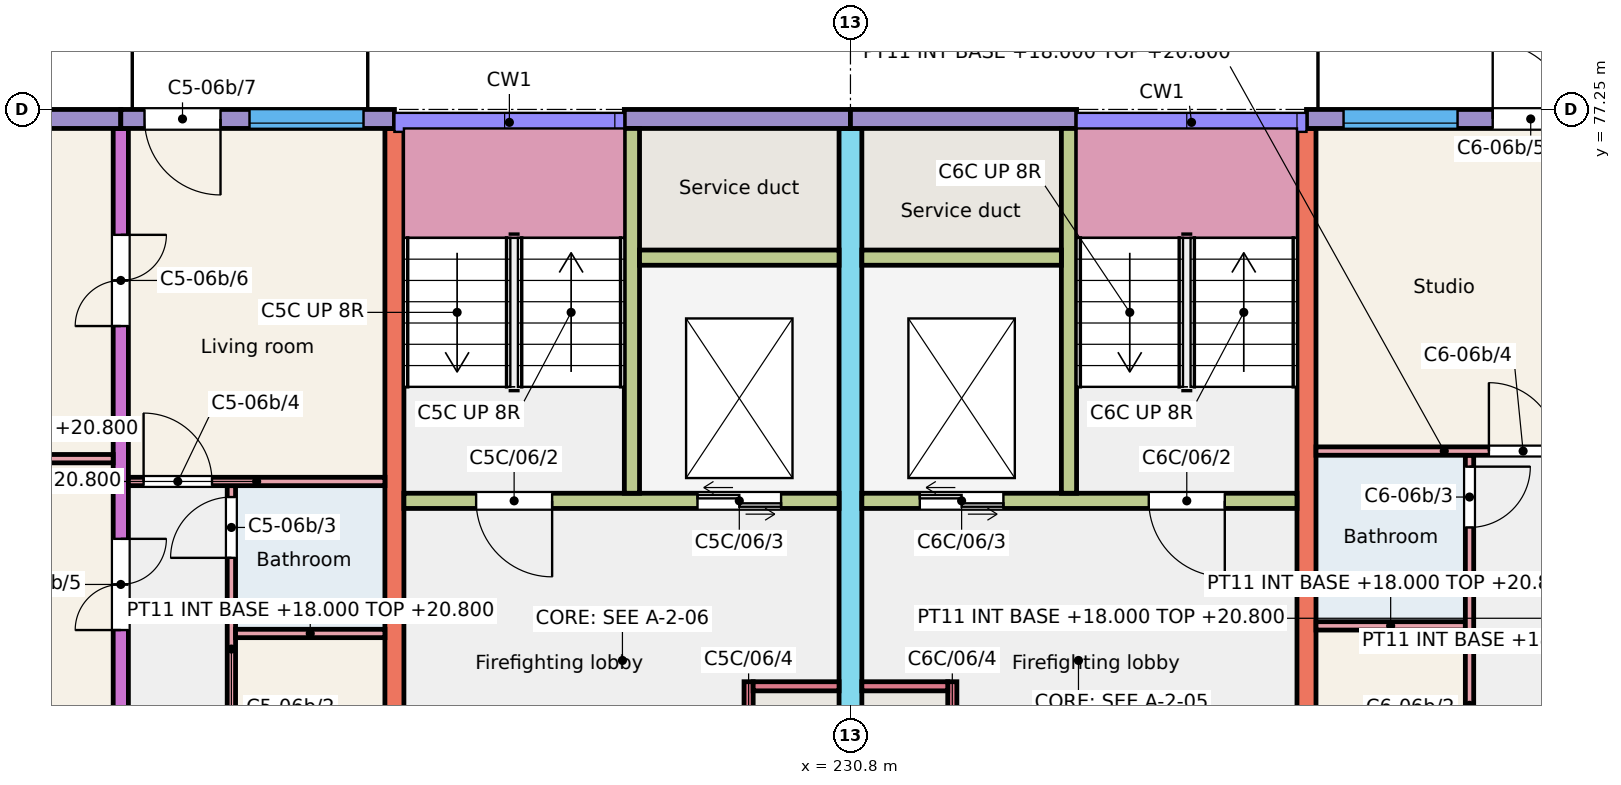
"""IFC4 building model, lengths in metres.
Left out: names, types, materials, properties, quantities, classifications, styles, units other than length and angle.
Written with IfcOpenShell. Run it as: python <this file> out.ifc"""

import sys

from ifc_helpers import new_model, si_unit, direction, frame, frame_2d, origin, place, context, subcontext, project, spatial, rectangle, extrude, element, fill, save


model = new_model("IFC4")
c1 = context("Model", 3, precision=1e-05, world=origin(), true_north=direction((0.0, 1.0)))
c2 = subcontext(c1, "Body", "Model", "MODEL_VIEW")
j1 = project(units=[si_unit("LENGTHUNIT", "METRE"), si_unit("PLANEANGLEUNIT", "RADIAN")], contexts=[c1])
p1 = place(None, origin())
s1 = spatial("IfcSite", under=j1, at=p1, CompositionType="ELEMENT")
p2 = place(p1, origin())
s2 = spatial("IfcBuilding", under=s1, at=p2, CompositionType="ELEMENT")
p3 = place(p2, frame((0.0, 0.0, 18.0)))
s3 = spatial("IfcBuildingStorey", under=s2, at=p3, CompositionType="ELEMENT", Elevation=18.0)
p4 = place(p3, frame((221.2, 68.0, 0.0), z_axis=(0.0, 0.0, 1.0), x_axis=(0.0, 1.0, 0.0)))
e1 = element("IfcWall", 1, at=p4, inside=s3, PredefinedType="SHEAR", context=c2, shape_type="SweptSolid", body=[
    extrude(rectangle(XDim=9.0, YDim=0.2, at=frame_2d((4.5, 0.0))), origin(), (0.0, 0.0, 1.0), 3.0),
])
p5 = place(p4, frame((2.4, 0.0, 0.0)))
e2 = element("IfcOpeningElement", 2, at=p5, cuts=e1, PredefinedType="OPENING", context=c2, shape_type="SweptSolid", body=[
    extrude(rectangle(XDim=1.2, YDim=2.1, at=frame_2d((0.6, 1.05))), frame((0.0, 0.11, 0.0), z_axis=(0.0, -1.0, 0.0), x_axis=(1.0, 0.0, 0.0)), (0.0, 0.0, 1.0), 0.22),
])
p6 = place(p4, frame((6.4, 0.0, 0.0)))
e3 = element("IfcOpeningElement", 3, at=p6, cuts=e1, PredefinedType="OPENING", context=c2, shape_type="SweptSolid", body=[
    extrude(rectangle(XDim=1.2, YDim=2.1, at=frame_2d((0.6, 1.05))), frame((0.0, 0.11, 0.0), z_axis=(0.0, -1.0, 0.0), x_axis=(1.0, 0.0, 0.0)), (0.0, 0.0, 1.0), 0.22),
])
p7 = place(p3, frame((224.8, 68.0, 0.0), z_axis=(0.0, 0.0, 1.0), x_axis=(0.0, 1.0, 0.0)))
e4 = element("IfcWall", 4, at=p7, inside=s3, PredefinedType="SHEAR", context=c2, shape_type="SweptSolid", body=[
    extrude(rectangle(XDim=9.0, YDim=0.25, at=frame_2d((4.5, 0.0))), origin(), (0.0, 0.0, 1.0), 3.0),
])
p8 = place(p3, frame((230.8, 66.0, 0.0), z_axis=(0.0, 0.0, 1.0), x_axis=(0.0, 1.0, 0.0)))
e5 = element("IfcWall", 5, at=p8, inside=s3, PredefinedType="SHEAR", context=c2, shape_type="SweptSolid", body=[
    extrude(rectangle(XDim=11.0, YDim=0.3, at=frame_2d((5.5, 0.0))), origin(), (0.0, 0.0, 1.0), 3.0),
])
p9 = place(p8, frame((0.3, 0.0, 0.0)))
e6 = element("IfcOpeningElement", 6, at=p9, cuts=e5, PredefinedType="OPENING", context=c2, shape_type="SweptSolid", body=[
    extrude(rectangle(XDim=1.2, YDim=2.1, at=frame_2d((0.6, 1.05))), frame((0.0, 0.16, 0.0), z_axis=(0.0, -1.0, 0.0), x_axis=(1.0, 0.0, 0.0)), (0.0, 0.0, 1.0), 0.32),
])
p10 = place(p3, frame((236.8, 68.0, 0.0), z_axis=(0.0, 0.0, 1.0), x_axis=(0.0, 1.0, 0.0)))
e7 = element("IfcWall", 7, at=p10, inside=s3, PredefinedType="SHEAR", context=c2, shape_type="SweptSolid", body=[
    extrude(rectangle(XDim=9.0, YDim=0.25, at=frame_2d((4.5, 0.0))), origin(), (0.0, 0.0, 1.0), 3.0),
])
p11 = place(p3, frame((217.6, 77.125, 0.0), z_axis=(0.0, 0.0, 1.0), x_axis=(1.0, 0.0, 0.0)))
e8 = element("IfcWall", 8, at=p11, inside=s3, PredefinedType="SOLIDWALL", context=c2, shape_type="SweptSolid", body=[
    extrude(rectangle(XDim=3.6, YDim=0.25, at=frame_2d((1.8, 0.0))), origin(), (0.0, 0.0, 1.0), 3.0),
])
p12 = place(p11, frame((1.05, 0.0, 0.9)))
e9 = element("IfcOpeningElement", 9, at=p12, cuts=e8, PredefinedType="OPENING", context=c2, shape_type="SweptSolid", body=[
    extrude(rectangle(XDim=1.5, YDim=1.5, at=frame_2d((0.75, 0.75))), frame((0.0, 0.135, 0.0), z_axis=(0.0, -1.0, 0.0), x_axis=(1.0, 0.0, 0.0)), (0.0, 0.0, 1.0), 0.27),
])
p13 = place(p3, frame((221.2, 77.125, 0.0), z_axis=(0.0, 0.0, 1.0), x_axis=(1.0, 0.0, 0.0)))
e10 = element("IfcWall", 10, at=p13, inside=s3, PredefinedType="SOLIDWALL", context=c2, shape_type="SweptSolid", body=[
    extrude(rectangle(XDim=3.6, YDim=0.25, at=frame_2d((1.8, 0.0))), origin(), (0.0, 0.0, 1.0), 3.0),
])
p14 = place(p13, frame((1.694, 0.0, 0.9)))
e11 = element("IfcOpeningElement", 11, at=p14, cuts=e10, PredefinedType="OPENING", context=c2, shape_type="SweptSolid", body=[
    extrude(rectangle(XDim=1.5, YDim=1.5, at=frame_2d((0.75, 0.75))), frame((0.0, 0.135, 0.0), z_axis=(0.0, -1.0, 0.0), x_axis=(1.0, 0.0, 0.0)), (0.0, 0.0, 1.0), 0.27),
])
p15 = place(p13, frame((0.312, 0.0, 0.0)))
e12 = element("IfcOpeningElement", 12, at=p15, cuts=e10, PredefinedType="OPENING", context=c2, shape_type="SweptSolid", body=[
    extrude(rectangle(XDim=1.0, YDim=2.1, at=frame_2d((0.5, 1.05))), frame((0.0, 0.135, 0.0), z_axis=(0.0, -1.0, 0.0), x_axis=(1.0, 0.0, 0.0)), (0.0, 0.0, 1.0), 0.27),
])
p16 = place(p3, frame((227.825, 77.125, 0.0), z_axis=(0.0, 0.0, 1.0), x_axis=(1.0, 0.0, 0.0)))
e13 = element("IfcWall", 13, at=p16, inside=s3, PredefinedType="SOLIDWALL", context=c2, shape_type="SweptSolid", body=[
    extrude(rectangle(XDim=2.975, YDim=0.25, at=frame_2d((1.488, 0.0))), origin(), (0.0, 0.0, 1.0), 3.0),
])
p17 = place(p3, frame((224.925, 72.1, 0.0), z_axis=(0.0, 0.0, 1.0), x_axis=(1.0, 0.0, 0.0)))
e14 = element("IfcWall", 14, at=p17, inside=s3, PredefinedType="SHEAR", context=c2, shape_type="SweptSolid", body=[
    extrude(rectangle(XDim=5.725, YDim=0.2, at=frame_2d((2.862, 0.0))), origin(), (0.0, 0.0, 1.0), 3.0),
])
p18 = place(p17, frame((0.95, 0.0, 0.0)))
e15 = element("IfcOpeningElement", 15, at=p18, cuts=e14, PredefinedType="OPENING", context=c2, shape_type="SweptSolid", body=[
    extrude(rectangle(XDim=1.0, YDim=2.1, at=frame_2d((0.5, 1.05))), frame((0.0, 0.11, 0.0), z_axis=(0.0, -1.0, 0.0), x_axis=(1.0, 0.0, 0.0)), (0.0, 0.0, 1.0), 0.22),
])
p19 = place(p17, frame((3.863, 0.0, 0.0)))
e16 = element("IfcOpeningElement", 16, at=p19, cuts=e14, PredefinedType="OPENING", context=c2, shape_type="SweptSolid", body=[
    extrude(rectangle(XDim=1.1, YDim=2.1, at=frame_2d((0.55, 1.05))), frame((0.0, 0.11, 0.0), z_axis=(0.0, -1.0, 0.0), x_axis=(1.0, 0.0, 0.0)), (0.0, 0.0, 1.0), 0.22),
])
p20 = place(p3, frame((227.925, 72.2, 0.0), z_axis=(0.0, 0.0, 1.0), x_axis=(0.0, 1.0, 0.0)))
e17 = element("IfcWall", 17, at=p20, inside=s3, PredefinedType="SHEAR", context=c2, shape_type="SweptSolid", body=[
    extrude(rectangle(XDim=4.8, YDim=0.2, at=frame_2d((2.4, 0.0))), origin(), (0.0, 0.0, 1.0), 3.0),
])
p21 = place(p3, frame((228.025, 75.3, 0.0), z_axis=(0.0, 0.0, 1.0), x_axis=(1.0, 0.0, 0.0)))
e18 = element("IfcWall", 18, at=p21, inside=s3, PredefinedType="SHEAR", context=c2, shape_type="SweptSolid", body=[
    extrude(rectangle(XDim=2.625, YDim=0.2, at=frame_2d((1.312, 0.0))), origin(), (0.0, 0.0, 1.0), 3.0),
])
p22 = place(p3, frame((229.46, 68.0, 0.0), z_axis=(0.0, 0.0, 1.0), x_axis=(0.0, 1.0, 0.0)))
e19 = element("IfcWall", 19, at=p22, inside=s3, PredefinedType="SHEAR", context=c2, shape_type="SweptSolid", body=[
    extrude(rectangle(XDim=1.72, YDim=0.12, at=frame_2d((0.86, 0.0))), origin(), (0.0, 0.0, 1.0), 3.0),
])
p23 = place(p22, frame((0.45, 0.0, 0.0)))
e20 = element("IfcOpeningElement", 20, at=p23, cuts=e19, PredefinedType="OPENING", context=c2, shape_type="SweptSolid", body=[
    extrude(rectangle(XDim=0.9, YDim=2.1, at=frame_2d((0.45, 1.05))), frame((0.0, 0.07, 0.0), z_axis=(0.0, -1.0, 0.0), x_axis=(1.0, 0.0, 0.0)), (0.0, 0.0, 1.0), 0.14),
])
p24 = place(p3, frame((229.52, 69.66, 0.0), z_axis=(0.0, 0.0, 1.0), x_axis=(1.0, 0.0, 0.0)))
e21 = element("IfcWall", 21, at=p24, inside=s3, PredefinedType="SHEAR", context=c2, shape_type="SweptSolid", body=[
    extrude(rectangle(XDim=1.13, YDim=0.12, at=frame_2d((0.565, 0.0))), origin(), (0.0, 0.0, 1.0), 3.0),
])
p25 = place(p3, frame((230.8, 77.125, 0.0), z_axis=(0.0, 0.0, 1.0), x_axis=(1.0, 0.0, 0.0)))
e22 = element("IfcWall", 22, at=p25, inside=s3, PredefinedType="SOLIDWALL", context=c2, shape_type="SweptSolid", body=[
    extrude(rectangle(XDim=2.975, YDim=0.25, at=frame_2d((1.487, 0.0))), origin(), (0.0, 0.0, 1.0), 3.0),
])
p26 = place(p3, frame((230.95, 72.1, 0.0), z_axis=(0.0, 0.0, 1.0), x_axis=(1.0, 0.0, 0.0)))
e23 = element("IfcWall", 23, at=p26, inside=s3, PredefinedType="SHEAR", context=c2, shape_type="SweptSolid", body=[
    extrude(rectangle(XDim=5.725, YDim=0.2, at=frame_2d((2.863, 0.0))), origin(), (0.0, 0.0, 1.0), 3.0),
])
p27 = place(p26, frame((3.775, 0.0, 0.0)))
e24 = element("IfcOpeningElement", 24, at=p27, cuts=e23, PredefinedType="OPENING", context=c2, shape_type="SweptSolid", body=[
    extrude(rectangle(XDim=1.0, YDim=2.1, at=frame_2d((0.5, 1.05))), frame((0.0, 0.11, 0.0), z_axis=(0.0, -1.0, 0.0), x_axis=(1.0, 0.0, 0.0)), (0.0, 0.0, 1.0), 0.22),
])
p28 = place(p26, frame((0.762, 0.0, 0.0)))
e25 = element("IfcOpeningElement", 25, at=p28, cuts=e23, PredefinedType="OPENING", context=c2, shape_type="SweptSolid", body=[
    extrude(rectangle(XDim=1.1, YDim=2.1, at=frame_2d((0.55, 1.05))), frame((0.0, 0.11, 0.0), z_axis=(0.0, -1.0, 0.0), x_axis=(1.0, 0.0, 0.0)), (0.0, 0.0, 1.0), 0.22),
])
p29 = place(p3, frame((233.675, 72.2, 0.0), z_axis=(0.0, 0.0, 1.0), x_axis=(0.0, 1.0, 0.0)))
e26 = element("IfcWall", 26, at=p29, inside=s3, PredefinedType="SHEAR", context=c2, shape_type="SweptSolid", body=[
    extrude(rectangle(XDim=4.8, YDim=0.2, at=frame_2d((2.4, 0.0))), origin(), (0.0, 0.0, 1.0), 3.0),
])
p30 = place(p3, frame((230.95, 75.3, 0.0), z_axis=(0.0, 0.0, 1.0), x_axis=(1.0, 0.0, 0.0)))
e27 = element("IfcWall", 27, at=p30, inside=s3, PredefinedType="SHEAR", context=c2, shape_type="SweptSolid", body=[
    extrude(rectangle(XDim=2.625, YDim=0.2, at=frame_2d((1.312, 0.0))), origin(), (0.0, 0.0, 1.0), 3.0),
])
p31 = place(p3, frame((232.14, 68.0, 0.0), z_axis=(0.0, 0.0, 1.0), x_axis=(0.0, 1.0, 0.0)))
e28 = element("IfcWall", 28, at=p31, inside=s3, PredefinedType="SHEAR", context=c2, shape_type="SweptSolid", body=[
    extrude(rectangle(XDim=1.72, YDim=0.12, at=frame_2d((0.86, 0.0))), origin(), (0.0, 0.0, 1.0), 3.0),
])
p32 = place(p31, frame((0.45, 0.0, 0.0)))
e29 = element("IfcOpeningElement", 29, at=p32, cuts=e28, PredefinedType="OPENING", context=c2, shape_type="SweptSolid", body=[
    extrude(rectangle(XDim=0.9, YDim=2.1, at=frame_2d((0.45, 1.05))), frame((0.0, 0.07, 0.0), z_axis=(0.0, -1.0, 0.0), x_axis=(1.0, 0.0, 0.0)), (0.0, 0.0, 1.0), 0.14),
])
p33 = place(p3, frame((230.95, 69.66, 0.0), z_axis=(0.0, 0.0, 1.0), x_axis=(1.0, 0.0, 0.0)))
e30 = element("IfcWall", 30, at=p33, inside=s3, PredefinedType="SHEAR", context=c2, shape_type="SweptSolid", body=[
    extrude(rectangle(XDim=1.13, YDim=0.12, at=frame_2d((0.565, 0.0))), origin(), (0.0, 0.0, 1.0), 3.0),
])
p34 = place(p3, frame((236.8, 77.125, 0.0), z_axis=(0.0, 0.0, 1.0), x_axis=(1.0, 0.0, 0.0)))
e31 = element("IfcWall", 31, at=p34, inside=s3, PredefinedType="SOLIDWALL", context=c2, shape_type="SweptSolid", body=[
    extrude(rectangle(XDim=3.6, YDim=0.25, at=frame_2d((1.8, 0.0))), origin(), (0.0, 0.0, 1.0), 3.0),
])
p35 = place(p34, frame((0.488, 0.0, 0.9)))
e32 = element("IfcOpeningElement", 32, at=p35, cuts=e31, PredefinedType="OPENING", context=c2, shape_type="SweptSolid", body=[
    extrude(rectangle(XDim=1.5, YDim=1.5, at=frame_2d((0.75, 0.75))), frame((0.0, 0.135, 0.0), z_axis=(0.0, -1.0, 0.0), x_axis=(1.0, 0.0, 0.0)), (0.0, 0.0, 1.0), 0.27),
])
p36 = place(p34, frame((2.45, 0.0, 0.0)))
e33 = element("IfcOpeningElement", 33, at=p36, cuts=e31, PredefinedType="OPENING", context=c2, shape_type="SweptSolid", body=[
    extrude(rectangle(XDim=1.0, YDim=2.1, at=frame_2d((0.5, 1.05))), frame((0.0, 0.135, 0.0), z_axis=(0.0, -1.0, 0.0), x_axis=(1.0, 0.0, 0.0)), (0.0, 0.0, 1.0), 0.27),
])
p37 = place(p3, frame((222.655, 68.0, 0.0), z_axis=(0.0, 0.0, 1.0), x_axis=(0.0, 1.0, 0.0)))
e34 = element("IfcWall", 34, at=p37, inside=s3, PredefinedType="PARTITIONING", context=c2, shape_type="SweptSolid", body=[
    extrude(rectangle(XDim=4.3, YDim=0.11, at=frame_2d((2.15, 0.0))), origin(), (0.0, 0.0, 1.0), 2.8),
])
p38 = place(p37, frame((0.2, 0.0, 0.0)))
e35 = element("IfcOpeningElement", 35, at=p38, cuts=e34, PredefinedType="OPENING", context=c2, shape_type="SweptSolid", body=[
    extrude(rectangle(XDim=0.8, YDim=2.1, at=frame_2d((0.4, 1.05))), frame((0.0, 0.065, 0.0), z_axis=(0.0, -1.0, 0.0), x_axis=(1.0, 0.0, 0.0)), (0.0, 0.0, 1.0), 0.13),
])
p39 = place(p37, frame((3.35, 0.0, 0.0)))
e36 = element("IfcOpeningElement", 36, at=p39, cuts=e34, PredefinedType="OPENING", context=c2, shape_type="SweptSolid", body=[
    extrude(rectangle(XDim=0.8, YDim=2.1, at=frame_2d((0.4, 1.05))), frame((0.0, 0.065, 0.0), z_axis=(0.0, -1.0, 0.0), x_axis=(1.0, 0.0, 0.0)), (0.0, 0.0, 1.0), 0.13),
])
p40 = place(p3, frame((222.71, 70.355, 0.0), z_axis=(0.0, 0.0, 1.0), x_axis=(1.0, 0.0, 0.0)))
e37 = element("IfcWall", 37, at=p40, inside=s3, PredefinedType="PARTITIONING", context=c2, shape_type="SweptSolid", body=[
    extrude(rectangle(XDim=1.965, YDim=0.11, at=frame_2d((0.982, 0.0))), origin(), (0.0, 0.0, 1.0), 2.8),
])
p41 = place(p3, frame((221.3, 72.355, 0.0), z_axis=(0.0, 0.0, 1.0), x_axis=(1.0, 0.0, 0.0)))
e38 = element("IfcWall", 38, at=p41, inside=s3, PredefinedType="PARTITIONING", context=c2, shape_type="SweptSolid", body=[
    extrude(rectangle(XDim=3.375, YDim=0.11, at=frame_2d((1.688, 0.0))), origin(), (0.0, 0.0, 1.0), 2.8),
])
p42 = place(p41, frame((0.2, 0.0, 0.0)))
e39 = element("IfcOpeningElement", 39, at=p42, cuts=e38, PredefinedType="OPENING", context=c2, shape_type="SweptSolid", body=[
    extrude(rectangle(XDim=0.9, YDim=2.1, at=frame_2d((0.45, 1.05))), frame((0.0, 0.065, 0.0), z_axis=(0.0, -1.0, 0.0), x_axis=(1.0, 0.0, 0.0)), (0.0, 0.0, 1.0), 0.13),
])
p43 = place(p3, frame((217.7, 72.655, 0.0), z_axis=(0.0, 0.0, 1.0), x_axis=(1.0, 0.0, 0.0)))
e40 = element("IfcWall", 40, at=p43, inside=s3, PredefinedType="PARTITIONING", context=c2, shape_type="SweptSolid", body=[
    extrude(rectangle(XDim=3.4, YDim=0.11, at=frame_2d((1.7, 0.0))), origin(), (0.0, 0.0, 1.0), 2.8),
])
p44 = place(p3, frame((236.925, 70.455, 0.0), z_axis=(0.0, 0.0, 1.0), x_axis=(1.0, 0.0, 0.0)))
e41 = element("IfcWall", 41, at=p44, inside=s3, PredefinedType="PARTITIONING", context=c2, shape_type="SweptSolid", body=[
    extrude(rectangle(XDim=1.965, YDim=0.11, at=frame_2d((0.982, 0.0))), origin(), (0.0, 0.0, 1.0), 2.8),
])
p45 = place(p3, frame((238.945, 68.0, 0.0), z_axis=(0.0, 0.0, 1.0), x_axis=(0.0, 1.0, 0.0)))
e42 = element("IfcWall", 42, at=p45, inside=s3, PredefinedType="PARTITIONING", context=c2, shape_type="SweptSolid", body=[
    extrude(rectangle(XDim=4.7, YDim=0.11, at=frame_2d((2.35, 0.0))), origin(), (0.0, 0.0, 1.0), 2.8),
])
p46 = place(p45, frame((0.2, 0.0, 0.0)))
e43 = element("IfcOpeningElement", 43, at=p46, cuts=e42, PredefinedType="OPENING", context=c2, shape_type="SweptSolid", body=[
    extrude(rectangle(XDim=0.8, YDim=2.1, at=frame_2d((0.4, 1.05))), frame((0.0, 0.065, 0.0), z_axis=(0.0, -1.0, 0.0), x_axis=(1.0, 0.0, 0.0)), (0.0, 0.0, 1.0), 0.13),
])
p47 = place(p45, frame((3.75, 0.0, 0.0)))
e44 = element("IfcOpeningElement", 44, at=p47, cuts=e42, PredefinedType="OPENING", context=c2, shape_type="SweptSolid", body=[
    extrude(rectangle(XDim=0.8, YDim=2.1, at=frame_2d((0.4, 1.05))), frame((0.0, 0.065, 0.0), z_axis=(0.0, -1.0, 0.0), x_axis=(1.0, 0.0, 0.0)), (0.0, 0.0, 1.0), 0.13),
])
p48 = place(p3, frame((236.925, 72.755, 0.0), z_axis=(0.0, 0.0, 1.0), x_axis=(1.0, 0.0, 0.0)))
e45 = element("IfcWall", 45, at=p48, inside=s3, PredefinedType="PARTITIONING", context=c2, shape_type="SweptSolid", body=[
    extrude(rectangle(XDim=3.375, YDim=0.11, at=frame_2d((1.688, 0.0))), origin(), (0.0, 0.0, 1.0), 2.8),
])
p49 = place(p48, frame((2.275, 0.0, 0.0)))
e46 = element("IfcOpeningElement", 46, at=p49, cuts=e45, PredefinedType="OPENING", context=c2, shape_type="SweptSolid", body=[
    extrude(rectangle(XDim=0.9, YDim=2.1, at=frame_2d((0.45, 1.05))), frame((0.0, 0.065, 0.0), z_axis=(0.0, -1.0, 0.0), x_axis=(1.0, 0.0, 0.0)), (0.0, 0.0, 1.0), 0.13),
])
p50 = place(p14, origin())
e47 = element("IfcWindow", 47, at=p50, inside=s3, PartitioningType="SINGLE_PANEL", PredefinedType="WINDOW", context=c2, shape_type="SweptSolid", body=[
    extrude(rectangle(XDim=1.5, YDim=1.5, at=frame_2d((0.75, 0.75))), frame((0.0, -0.025, 0.0), z_axis=(0.0, -1.0, 0.0), x_axis=(1.0, 0.0, 0.0)), (0.0, 0.0, 1.0), 0.06),
])
fill(e11, e47)
p51 = place(p35, origin())
e48 = element("IfcWindow", 48, at=p51, inside=s3, PartitioningType="SINGLE_PANEL", PredefinedType="WINDOW", context=c2, shape_type="SweptSolid", body=[
    extrude(rectangle(XDim=1.5, YDim=1.5, at=frame_2d((0.75, 0.75))), frame((0.0, -0.025, 0.0), z_axis=(0.0, -1.0, 0.0), x_axis=(1.0, 0.0, 0.0)), (0.0, 0.0, 1.0), 0.06),
])
fill(e32, e48)
p52 = place(p39, origin())
e49 = element("IfcDoor", 49, at=p52, inside=s3, OperationType="SINGLE_SWING_LEFT", PredefinedType="DOOR", context=c2, shape_type="SweptSolid", body=[
    extrude(rectangle(XDim=0.8, YDim=2.1, at=frame_2d((0.4, 1.05))), frame((0.0, 0.025, 0.0), z_axis=(0.0, -1.0, 0.0), x_axis=(1.0, 0.0, 0.0)), (0.0, 0.0, 1.0), 0.05),
])
fill(e36, e49)
p53 = place(p42, origin())
e50 = element("IfcDoor", 50, at=p53, inside=s3, OperationType="SINGLE_SWING_LEFT", PredefinedType="DOOR", context=c2, shape_type="SweptSolid", body=[
    extrude(rectangle(XDim=0.9, YDim=2.1, at=frame_2d((0.45, 1.05))), frame((0.0, 0.025, 0.0), z_axis=(0.0, -1.0, 0.0), x_axis=(1.0, 0.0, 0.0)), (0.0, 0.0, 1.0), 0.05),
])
fill(e39, e50)
p54 = place(p5, origin())
e51 = element("IfcDoor", 51, at=p54, inside=s3, OperationType="DOUBLE_DOOR_SINGLE_SWING", PredefinedType="DOOR", context=c2, shape_type="SweptSolid", body=[
    extrude(rectangle(XDim=1.2, YDim=2.1, at=frame_2d((0.6, 1.05))), frame((0.0, 0.025, 0.0), z_axis=(0.0, -1.0, 0.0), x_axis=(1.0, 0.0, 0.0)), (0.0, 0.0, 1.0), 0.05),
])
fill(e2, e51)
p55 = place(p6, origin())
e52 = element("IfcDoor", 52, at=p55, inside=s3, OperationType="DOUBLE_DOOR_SINGLE_SWING", PredefinedType="DOOR", context=c2, shape_type="SweptSolid", body=[
    extrude(rectangle(XDim=1.2, YDim=2.1, at=frame_2d((0.6, 1.05))), frame((0.0, 0.025, 0.0), z_axis=(0.0, -1.0, 0.0), x_axis=(1.0, 0.0, 0.0)), (0.0, 0.0, 1.0), 0.05),
])
fill(e3, e52)
p56 = place(p15, origin())
e53 = element("IfcDoor", 53, at=p56, inside=s3, OperationType="SINGLE_SWING_RIGHT", PredefinedType="DOOR", context=c2, shape_type="SweptSolid", body=[
    extrude(rectangle(XDim=1.0, YDim=2.1, at=frame_2d((0.5, 1.05))), frame((0.0, 0.025, 0.0), z_axis=(0.0, -1.0, 0.0), x_axis=(1.0, 0.0, 0.0)), (0.0, 0.0, 1.0), 0.05),
])
fill(e12, e53)
p57 = place(p47, origin())
e54 = element("IfcDoor", 54, at=p57, inside=s3, OperationType="SINGLE_SWING_RIGHT", PredefinedType="DOOR", context=c2, shape_type="SweptSolid", body=[
    extrude(rectangle(XDim=0.8, YDim=2.1, at=frame_2d((0.4, 1.05))), frame((0.0, 0.025, 0.0), z_axis=(0.0, -1.0, 0.0), x_axis=(1.0, 0.0, 0.0)), (0.0, 0.0, 1.0), 0.05),
])
fill(e44, e54)
p58 = place(p49, origin())
e55 = element("IfcDoor", 55, at=p58, inside=s3, OperationType="SINGLE_SWING_LEFT", PredefinedType="DOOR", context=c2, shape_type="SweptSolid", body=[
    extrude(rectangle(XDim=0.9, YDim=2.1, at=frame_2d((0.45, 1.05))), frame((0.0, 0.025, 0.0), z_axis=(0.0, -1.0, 0.0), x_axis=(1.0, 0.0, 0.0)), (0.0, 0.0, 1.0), 0.05),
])
fill(e46, e55)
p59 = place(p36, origin())
e56 = element("IfcDoor", 56, at=p59, inside=s3, OperationType="SINGLE_SWING_LEFT", PredefinedType="DOOR", context=c2, shape_type="SweptSolid", body=[
    extrude(rectangle(XDim=1.0, YDim=2.1, at=frame_2d((0.5, 1.05))), frame((0.0, 0.025, 0.0), z_axis=(0.0, -1.0, 0.0), x_axis=(1.0, 0.0, 0.0)), (0.0, 0.0, 1.0), 0.05),
])
fill(e33, e56)
p60 = place(p18, origin())
e57 = element("IfcDoor", 57, at=p60, inside=s3, OperationType="SINGLE_SWING_RIGHT", PredefinedType="DOOR", context=c2, shape_type="SweptSolid", body=[
    extrude(rectangle(XDim=1.0, YDim=2.1, at=frame_2d((0.5, 1.05))), frame((0.0, 0.025, 0.0), z_axis=(0.0, -1.0, 0.0), x_axis=(1.0, 0.0, 0.0)), (0.0, 0.0, 1.0), 0.05),
])
fill(e15, e57)
p61 = place(p19, origin())
e58 = element("IfcDoor", 58, at=p61, inside=s3, OperationType="DOUBLE_DOOR_SLIDING", PredefinedType="DOOR", context=c2, shape_type="SweptSolid", body=[
    extrude(rectangle(XDim=1.1, YDim=2.1, at=frame_2d((0.55, 1.05))), frame((0.0, 0.025, 0.0), z_axis=(0.0, -1.0, 0.0), x_axis=(1.0, 0.0, 0.0)), (0.0, 0.0, 1.0), 0.05),
])
fill(e16, e58)
p62 = place(p27, origin())
e59 = element("IfcDoor", 59, at=p62, inside=s3, OperationType="SINGLE_SWING_RIGHT", PredefinedType="DOOR", context=c2, shape_type="SweptSolid", body=[
    extrude(rectangle(XDim=1.0, YDim=2.1, at=frame_2d((0.5, 1.05))), frame((0.0, 0.025, 0.0), z_axis=(0.0, -1.0, 0.0), x_axis=(1.0, 0.0, 0.0)), (0.0, 0.0, 1.0), 0.05),
])
fill(e24, e59)
p63 = place(p28, origin())
e60 = element("IfcDoor", 60, at=p63, inside=s3, OperationType="DOUBLE_DOOR_SLIDING", PredefinedType="DOOR", context=c2, shape_type="SweptSolid", body=[
    extrude(rectangle(XDim=1.1, YDim=2.1, at=frame_2d((0.55, 1.05))), frame((0.0, 0.025, 0.0), z_axis=(0.0, -1.0, 0.0), x_axis=(1.0, 0.0, 0.0)), (0.0, 0.0, 1.0), 0.05),
])
fill(e25, e60)
save(model, sys.argv[1])
